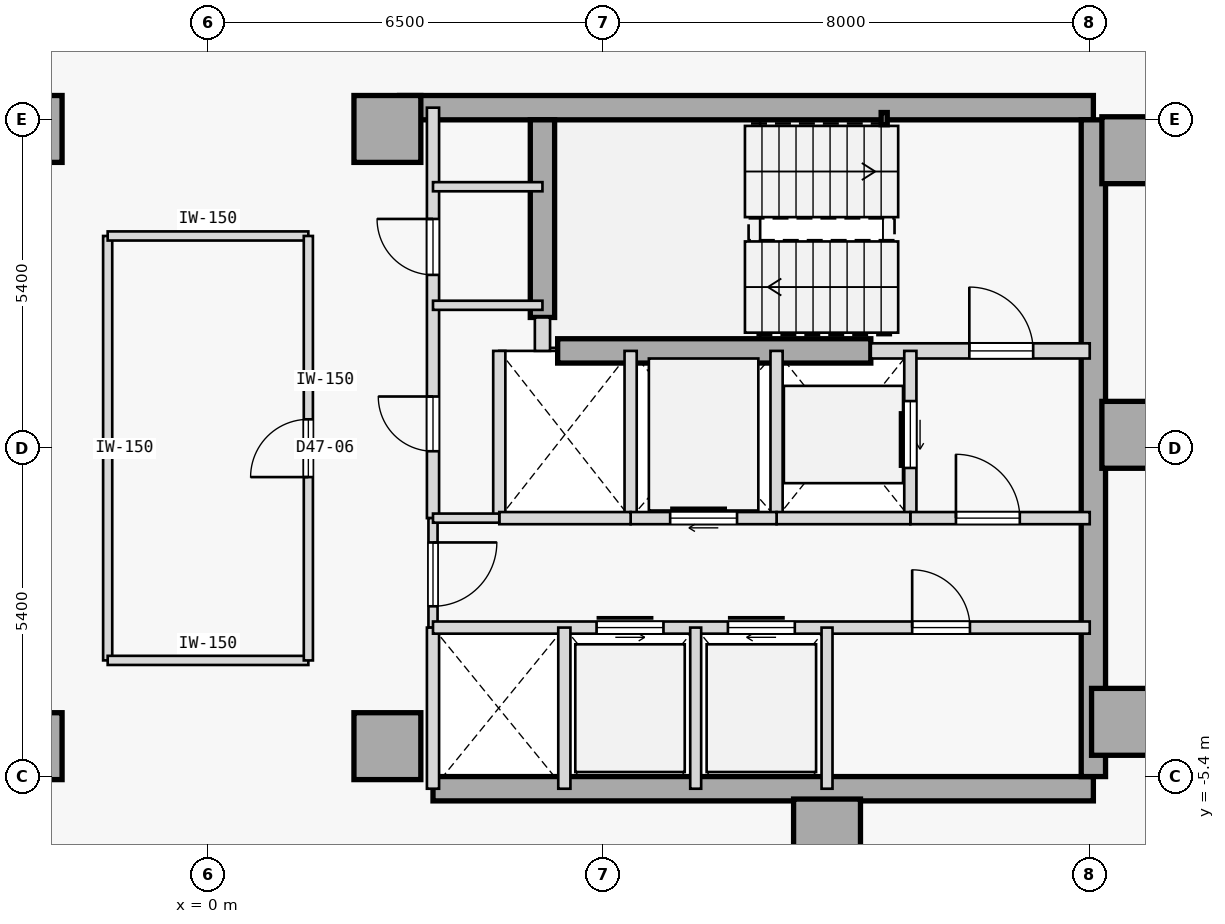
"""IFC4 building model, lengths in metres.
Left out: names, types, materials, properties, quantities, classifications, styles, units other than length and angle.
Written with IfcOpenShell. Run it as: python <this file> out.ifc"""

import sys

from ifc_helpers import new_model, si_unit, direction, frame, frame_2d, origin, origin_2d, place, context, subcontext, project, spatial, rectangle, hollow_rectangle, extrude, element, fill, save


model = new_model("IFC4")
c1 = context("Model", 3, precision=1e-05, world=origin(), true_north=direction((0.0, 1.0)))
c2 = subcontext(c1, "Body", "Model", "MODEL_VIEW")
j1 = project(units=[si_unit("LENGTHUNIT", "METRE"), si_unit("PLANEANGLEUNIT", "RADIAN")], contexts=[c1])
p1 = place(None, origin())
s1 = spatial("IfcSite", under=j1, at=p1, CompositionType="ELEMENT")
p2 = place(p1, origin())
s2 = spatial("IfcBuilding", under=s1, at=p2, CompositionType="ELEMENT")
p3 = place(p2, frame((0.0, 0.0, 182.0)))
s3 = spatial("IfcBuildingStorey", under=s2, at=p3, CompositionType="ELEMENT", Elevation=182.0)
for number, where, z_axis, x_axis in (
    (1, (-2.95, -4.9, 0.0), (0.0, 0.0, 1.0), (1.0, 0.0, 0.0)),
    (2, (-2.95, 5.25, 0.0), (0.0, 0.0, 1.0), (1.0, 0.0, 0.0)),
    (3, (15.25, 4.9, 0.0), (0.0, 0.0, 1.0), (1.0, 0.0, 0.0)),
    (4, (15.25, 0.22, 0.0), (0.0, 0.0, 1.0), (1.0, 0.0, 0.0)),
    (5, (15.08, -4.5, 0.0), (0.0, 0.0, 1.0), (1.0, 0.0, 0.0)),
    (6, (10.18, -6.32, 0.0), (0.0, 0.0, 1.0), (1.0, 0.0, 0.0)),
    (7, (2.95, -4.9, 0.0), (0.0, 0.0, 1.0), (1.0, 0.0, 0.0)),
    (8, (2.95, 5.25, 0.0), (0.0, 0.0, 1.0), (1.0, 0.0, 0.0)),
):
    element("IfcColumn", number, at=place(p3, frame(where, z_axis=z_axis, x_axis=x_axis)), inside=s3, PredefinedType="COLUMN", context=c2, shape_type="SweptSolid", body=[
        extrude(rectangle(XDim=1.1, YDim=1.1, at=origin_2d()), origin(), (0.0, 0.0, 1.0), 3.4),
    ])
p4 = place(p3, frame((3.15, 5.6, 0.0), z_axis=(0.0, 0.0, 1.0), x_axis=(1.0, 0.0, 0.0)))
e9 = element("IfcWall", 9, at=p4, inside=s3, PredefinedType="SHEAR", context=c2, shape_type="SweptSolid", body=[
    extrude(rectangle(XDim=11.41, YDim=0.4, at=frame_2d((5.705, 0.0))), origin(), (0.0, 0.0, 1.0), 3.175),
])
p5 = place(p3, frame((3.7, -5.6, 0.0), z_axis=(0.0, 0.0, 1.0), x_axis=(1.0, 0.0, 0.0)))
e10 = element("IfcWall", 10, at=p5, inside=s3, PredefinedType="SHEAR", context=c2, shape_type="SweptSolid", body=[
    extrude(rectangle(XDim=10.86, YDim=0.4, at=frame_2d((5.43, 0.0))), origin(), (0.0, 0.0, 1.0), 3.175),
])
p6 = place(p3, frame((14.56, -5.4, 0.0), z_axis=(0.0, 0.0, 1.0), x_axis=(0.0, 1.0, 0.0)))
e11 = element("IfcWall", 11, at=p6, inside=s3, PredefinedType="SHEAR", context=c2, shape_type="SweptSolid", body=[
    extrude(rectangle(XDim=10.8, YDim=0.4, at=frame_2d((5.4, 0.0))), origin(), (0.0, 0.0, 1.0), 3.175),
])
p7 = place(p3, frame((5.5, 2.15, 0.0), z_axis=(0.0, 0.0, 1.0), x_axis=(0.0, 1.0, 0.0)))
e12 = element("IfcWall", 12, at=p7, inside=s3, PredefinedType="SHEAR", context=c2, shape_type="SweptSolid", body=[
    extrude(rectangle(XDim=3.25, YDim=0.4, at=frame_2d((1.625, 0.0))), origin(), (0.0, 0.0, 1.0), 3.175),
])
p8 = place(p3, frame((5.75, 1.6, 0.0), z_axis=(0.0, 0.0, 1.0), x_axis=(1.0, 0.0, 0.0)))
e13 = element("IfcWall", 13, at=p8, inside=s3, PredefinedType="SHEAR", context=c2, shape_type="SweptSolid", body=[
    extrude(rectangle(XDim=5.15, YDim=0.4, at=frame_2d((2.575, 0.0))), origin(), (0.0, 0.0, 1.0), 3.175),
])
p9 = place(p3, frame((11.12, 5.42, 0.0), z_axis=(0.0, 0.0, 1.0), x_axis=(1.0, 0.0, 0.0)))
e14 = element("IfcColumn", 14, at=p9, inside=s3, PredefinedType="COLUMN", context=c2, shape_type="SweptSolid", body=[
    extrude(hollow_rectangle(XDim=0.1, YDim=0.2, WallThickness=0.008, at=origin_2d()), origin(), (0.0, 0.0, 1.0), 3.4),
])
p10 = place(p3, frame((10.9, 1.6, 0.0), z_axis=(0.0, 0.0, 1.0), x_axis=(1.0, 0.0, 0.0)))
e15 = element("IfcWall", 15, at=p10, inside=s3, PredefinedType="STANDARD", context=c2, shape_type="SweptSolid", body=[
    extrude(rectangle(XDim=3.6, YDim=0.25, at=frame_2d((1.8, 0.0))), origin(), (0.0, 0.0, 1.0), 3.175),
])
p11 = place(p10, frame((1.62, 0.0, 0.0)))
e16 = element("IfcOpeningElement", 16, at=p11, cuts=e15, PredefinedType="OPENING", context=c2, shape_type="SweptSolid", body=[
    extrude(rectangle(XDim=1.05, YDim=2.15, at=frame_2d((0.525, 1.075))), frame((0.0, 0.135, 0.0), z_axis=(0.0, -1.0, 0.0), x_axis=(1.0, 0.0, 0.0)), (0.0, 0.0, 1.0), 0.27),
])
p12 = place(p3, frame((5.5, 1.6, 0.0), z_axis=(0.0, 0.0, 1.0), x_axis=(0.0, 1.0, 0.0)))
e17 = element("IfcWall", 17, at=p12, inside=s3, PredefinedType="STANDARD", context=c2, shape_type="SweptSolid", body=[
    extrude(rectangle(XDim=0.55, YDim=0.25, at=frame_2d((0.275, 0.0))), origin(), (0.0, 0.0, 1.0), 3.175),
])
p13 = place(p3, frame((3.7, -1.15, 0.0), z_axis=(0.0, 0.0, 1.0), x_axis=(0.0, 1.0, 0.0)))
e18 = element("IfcWall", 18, at=p13, inside=s3, PredefinedType="STANDARD", context=c2, shape_type="SweptSolid", body=[
    extrude(rectangle(XDim=6.75, YDim=0.2, at=frame_2d((3.375, 0.0))), origin(), (0.0, 0.0, 1.0), 3.175),
])
p14 = place(p13, frame((1.1, 0.0, 0.0)))
e19 = element("IfcOpeningElement", 19, at=p14, cuts=e18, PredefinedType="OPENING", context=c2, shape_type="SweptSolid", body=[
    extrude(rectangle(XDim=0.9, YDim=2.15, at=frame_2d((0.45, 1.075))), frame((0.0, 0.11, 0.0), z_axis=(0.0, -1.0, 0.0), x_axis=(1.0, 0.0, 0.0)), (0.0, 0.0, 1.0), 0.22),
])
p15 = place(p13, frame((4.0, 0.0, 0.0)))
e20 = element("IfcOpeningElement", 20, at=p15, cuts=e18, PredefinedType="OPENING", context=c2, shape_type="SweptSolid", body=[
    extrude(rectangle(XDim=0.92, YDim=2.15, at=frame_2d((0.46, 1.075))), frame((0.0, 0.11, 0.0), z_axis=(0.0, -1.0, 0.0), x_axis=(1.0, 0.0, 0.0)), (0.0, 0.0, 1.0), 0.22),
])
p16 = place(p3, frame((3.7, -2.95, 0.0), z_axis=(0.0, 0.0, 1.0), x_axis=(0.0, 1.0, 0.0)))
e21 = element("IfcWall", 21, at=p16, inside=s3, PredefinedType="PARTITIONING", context=c2, shape_type="SweptSolid", body=[
    extrude(rectangle(XDim=1.8, YDim=0.15, at=frame_2d((0.9, 0.0))), origin(), (0.0, 0.0, 1.0), 3.175),
])
p17 = place(p16, frame((0.35, 0.0, 0.0)))
e22 = element("IfcOpeningElement", 22, at=p17, cuts=e21, PredefinedType="OPENING", context=c2, shape_type="SweptSolid", body=[
    extrude(rectangle(XDim=1.05, YDim=2.18, at=frame_2d((0.525, 1.09))), frame((0.0, 0.085, 0.0), z_axis=(0.0, -1.0, 0.0), x_axis=(1.0, 0.0, 0.0)), (0.0, 0.0, 1.0), 0.17),
])
p18 = place(p3, frame((3.7, -5.6, 0.0), z_axis=(0.0, 0.0, 1.0), x_axis=(0.0, 1.0, 0.0)))
e23 = element("IfcWall", 23, at=p18, inside=s3, PredefinedType="STANDARD", context=c2, shape_type="SweptSolid", body=[
    extrude(rectangle(XDim=2.65, YDim=0.2, at=frame_2d((1.325, 0.0))), origin(), (0.0, 0.0, 1.0), 3.175),
])
p19 = place(p3, frame((11.55, -1.15, 0.0), z_axis=(0.0, 0.0, 1.0), x_axis=(0.0, 1.0, 0.0)))
e24 = element("IfcWall", 24, at=p19, inside=s3, PredefinedType="STANDARD", context=c2, shape_type="SweptSolid", body=[
    extrude(rectangle(XDim=2.75, YDim=0.2, at=frame_2d((1.375, 0.0))), origin(), (0.0, 0.0, 1.0), 3.175),
])
p20 = place(p19, frame((0.825, 0.0, 0.0)))
e25 = element("IfcOpeningElement", 25, at=p20, cuts=e24, PredefinedType="OPENING", context=c2, shape_type="SweptSolid", body=[
    extrude(rectangle(XDim=1.1, YDim=2.15, at=frame_2d((0.55, 1.075))), frame((0.0, 0.11, 0.0), z_axis=(0.0, -1.0, 0.0), x_axis=(1.0, 0.0, 0.0)), (0.0, 0.0, 1.0), 0.22),
])
p21 = place(p3, frame((9.35, -1.15, 0.0), z_axis=(0.0, 0.0, 1.0), x_axis=(0.0, 1.0, 0.0)))
e26 = element("IfcWall", 26, at=p21, inside=s3, PredefinedType="STANDARD", context=c2, shape_type="SweptSolid", body=[
    extrude(rectangle(XDim=2.75, YDim=0.2, at=frame_2d((1.375, 0.0))), origin(), (0.0, 0.0, 1.0), 3.175),
])
p22 = place(p3, frame((11.55, -1.15, 0.0), z_axis=(0.0, 0.0, 1.0), x_axis=(1.0, 0.0, 0.0)))
e27 = element("IfcWall", 27, at=p22, inside=s3, PredefinedType="STANDARD", context=c2, shape_type="SweptSolid", body=[
    extrude(rectangle(XDim=2.95, YDim=0.2, at=frame_2d((1.475, 0.0))), origin(), (0.0, 0.0, 1.0), 3.175),
])
p23 = place(p22, frame((0.75, 0.0, 0.0)))
e28 = element("IfcOpeningElement", 28, at=p23, cuts=e27, PredefinedType="OPENING", context=c2, shape_type="SweptSolid", body=[
    extrude(rectangle(XDim=1.05, YDim=2.18, at=frame_2d((0.525, 1.09))), frame((0.0, 0.11, 0.0), z_axis=(0.0, -1.0, 0.0), x_axis=(1.0, 0.0, 0.0)), (0.0, 0.0, 1.0), 0.22),
])
p24 = place(p3, frame((9.35, -1.15, 0.0), z_axis=(0.0, 0.0, 1.0), x_axis=(1.0, 0.0, 0.0)))
e29 = element("IfcWall", 29, at=p24, inside=s3, PredefinedType="STANDARD", context=c2, shape_type="SweptSolid", body=[
    extrude(rectangle(XDim=2.2, YDim=0.2, at=frame_2d((1.1, 0.0))), origin(), (0.0, 0.0, 1.0), 3.175),
])
p25 = place(p3, frame((6.95, -1.15, 0.0), z_axis=(0.0, 0.0, 1.0), x_axis=(0.0, 1.0, 0.0)))
e30 = element("IfcWall", 30, at=p25, inside=s3, PredefinedType="STANDARD", context=c2, shape_type="SweptSolid", body=[
    extrude(rectangle(XDim=2.75, YDim=0.2, at=frame_2d((1.375, 0.0))), origin(), (0.0, 0.0, 1.0), 3.175),
])
p26 = place(p3, frame((6.95, -1.15, 0.0), z_axis=(0.0, 0.0, 1.0), x_axis=(1.0, 0.0, 0.0)))
e31 = element("IfcWall", 31, at=p26, inside=s3, PredefinedType="STANDARD", context=c2, shape_type="SweptSolid", body=[
    extrude(rectangle(XDim=2.4, YDim=0.2, at=frame_2d((1.2, 0.0))), origin(), (0.0, 0.0, 1.0), 3.175),
])
p27 = place(p26, frame((0.65, 0.0, 0.0)))
e32 = element("IfcOpeningElement", 32, at=p27, cuts=e31, PredefinedType="OPENING", context=c2, shape_type="SweptSolid", body=[
    extrude(rectangle(XDim=1.1, YDim=2.15, at=frame_2d((0.55, 1.075))), frame((0.0, 0.11, 0.0), z_axis=(0.0, -1.0, 0.0), x_axis=(1.0, 0.0, 0.0)), (0.0, 0.0, 1.0), 0.22),
])
p28 = place(p3, frame((4.79, -1.15, 0.0), z_axis=(0.0, 0.0, 1.0), x_axis=(0.0, 1.0, 0.0)))
e33 = element("IfcWall", 33, at=p28, inside=s3, PredefinedType="STANDARD", context=c2, shape_type="SweptSolid", body=[
    extrude(rectangle(XDim=2.75, YDim=0.2, at=frame_2d((1.375, 0.0))), origin(), (0.0, 0.0, 1.0), 3.175),
])
p29 = place(p3, frame((4.79, -1.15, 0.0), z_axis=(0.0, 0.0, 1.0), x_axis=(1.0, 0.0, 0.0)))
e34 = element("IfcWall", 34, at=p29, inside=s3, PredefinedType="STANDARD", context=c2, shape_type="SweptSolid", body=[
    extrude(rectangle(XDim=2.16, YDim=0.2, at=frame_2d((1.08, 0.0))), origin(), (0.0, 0.0, 1.0), 3.175),
])
p30 = place(p3, frame((3.7, -1.15, 0.0), z_axis=(0.0, 0.0, 1.0), x_axis=(1.0, 0.0, 0.0)))
e35 = element("IfcWall", 35, at=p30, inside=s3, PredefinedType="PARTITIONING", context=c2, shape_type="SweptSolid", body=[
    extrude(rectangle(XDim=1.09, YDim=0.15, at=frame_2d((0.545, 0.0))), origin(), (0.0, 0.0, 1.0), 3.175),
])
p31 = place(p3, frame((3.7, -2.95, 0.0), z_axis=(0.0, 0.0, 1.0), x_axis=(1.0, 0.0, 0.0)))
e36 = element("IfcWall", 36, at=p31, inside=s3, PredefinedType="STANDARD", context=c2, shape_type="SweptSolid", body=[
    extrude(rectangle(XDim=10.8, YDim=0.2, at=frame_2d((5.4, 0.0))), origin(), (0.0, 0.0, 1.0), 3.175),
])
p32 = place(p31, frame((2.69, 0.0, 0.0)))
e37 = element("IfcOpeningElement", 37, at=p32, cuts=e36, PredefinedType="OPENING", context=c2, shape_type="SweptSolid", body=[
    extrude(rectangle(XDim=1.1, YDim=2.15, at=frame_2d((0.55, 1.075))), frame((0.0, 0.11, 0.0), z_axis=(0.0, -1.0, 0.0), x_axis=(1.0, 0.0, 0.0)), (0.0, 0.0, 1.0), 0.22),
])
p33 = place(p31, frame((4.85, 0.0, 0.0)))
e38 = element("IfcOpeningElement", 38, at=p33, cuts=e36, PredefinedType="OPENING", context=c2, shape_type="SweptSolid", body=[
    extrude(rectangle(XDim=1.1, YDim=2.15, at=frame_2d((0.55, 1.075))), frame((0.0, 0.11, 0.0), z_axis=(0.0, -1.0, 0.0), x_axis=(1.0, 0.0, 0.0)), (0.0, 0.0, 1.0), 0.22),
])
p34 = place(p31, frame((7.88, 0.0, 0.0)))
e39 = element("IfcOpeningElement", 39, at=p34, cuts=e36, PredefinedType="OPENING", context=c2, shape_type="SweptSolid", body=[
    extrude(rectangle(XDim=0.95, YDim=2.15, at=frame_2d((0.475, 1.075))), frame((0.0, 0.11, 0.0), z_axis=(0.0, -1.0, 0.0), x_axis=(1.0, 0.0, 0.0)), (0.0, 0.0, 1.0), 0.22),
])
p35 = place(p3, frame((5.86, -5.6, 0.0), z_axis=(0.0, 0.0, 1.0), x_axis=(0.0, 1.0, 0.0)))
e40 = element("IfcWall", 40, at=p35, inside=s3, PredefinedType="STANDARD", context=c2, shape_type="SweptSolid", body=[
    extrude(rectangle(XDim=2.65, YDim=0.2, at=frame_2d((1.325, 0.0))), origin(), (0.0, 0.0, 1.0), 3.175),
])
for number, where, z_axis, x_axis in (
    (41, (10.18, -5.6, 0.0), (0.0, 0.0, 1.0), (0.0, 1.0, 0.0)),
    (42, (8.02, -5.6, 0.0), (0.0, 0.0, 1.0), (0.0, 1.0, 0.0)),
):
    element("IfcWall", number, at=place(p3, frame(where, z_axis=z_axis, x_axis=x_axis)), inside=s3, PredefinedType="STANDARD", context=c2, shape_type="SweptSolid", body=[
        extrude(rectangle(XDim=2.65, YDim=0.18, at=frame_2d((1.325, 0.0))), origin(), (0.0, 0.0, 1.0), 3.175),
    ])
for number, where, z_axis, x_axis in (
    (43, (3.7, 4.3, 0.0), (0.0, 0.0, 1.0), (1.0, 0.0, 0.0)),
    (44, (3.7, 2.35, 0.0), (0.0, 0.0, 1.0), (1.0, 0.0, 0.0)),
):
    element("IfcWall", number, at=place(p3, frame(where, z_axis=z_axis, x_axis=x_axis)), inside=s3, PredefinedType="PARTITIONING", context=c2, shape_type="SweptSolid", body=[
        extrude(rectangle(XDim=1.8, YDim=0.15, at=frame_2d((0.9, 0.0))), origin(), (0.0, 0.0, 1.0), 3.175),
    ])
p36 = place(p3, frame((-1.65, -3.49, 0.0), z_axis=(0.0, 0.0, 1.0), x_axis=(-3.4979712e-05, 0.999999999388, 0.0)))
e45 = element("IfcWall", 45, at=p36, inside=s3, PredefinedType="PARTITIONING", context=c2, shape_type="SweptSolid", body=[
    extrude(rectangle(XDim=6.979, YDim=0.15, at=frame_2d((3.49, 0.0))), origin(), (0.0, 0.0, 1.0), 3.175),
])
p37 = place(p3, frame((-1.65, -3.49, 0.0), z_axis=(0.0, 0.0, 1.0), x_axis=(0.999999975374, -0.000221926315, 0.0)))
e46 = element("IfcWall", 46, at=p37, inside=s3, PredefinedType="PARTITIONING", context=c2, shape_type="SweptSolid", body=[
    extrude(rectangle(XDim=3.3, YDim=0.15, at=frame_2d((1.65, 0.0))), origin(), (0.0, 0.0, 1.0), 3.175),
])
p38 = place(p3, frame((-1.65, 3.49, 0.0), z_axis=(0.0, 0.0, 1.0), x_axis=(1.0, 0.0, 0.0)))
e47 = element("IfcWall", 47, at=p38, inside=s3, PredefinedType="PARTITIONING", context=c2, shape_type="SweptSolid", body=[
    extrude(rectangle(XDim=3.3, YDim=0.15, at=frame_2d((1.65, 0.0))), origin(), (0.0, 0.0, 1.0), 3.175),
])
p39 = place(p3, frame((1.65, -3.49, 0.0), z_axis=(0.0, 0.0, 1.0), x_axis=(-6.9952083e-05, 0.999999997553, 0.0)))
e48 = element("IfcWall", 48, at=p39, inside=s3, PredefinedType="PARTITIONING", context=c2, shape_type="SweptSolid", body=[
    extrude(rectangle(XDim=6.98, YDim=0.15, at=frame_2d((3.49, 0.0))), origin(), (0.0, 0.0, 1.0), 3.175),
])
p40 = place(p39, frame((3.015, 0.0, 0.0)))
e49 = element("IfcOpeningElement", 49, at=p40, cuts=e48, PredefinedType="OPENING", context=c2, shape_type="SweptSolid", body=[
    extrude(rectangle(XDim=0.95, YDim=2.15, at=frame_2d((0.475, 1.075))), frame((0.0, 0.085, 0.0), z_axis=(0.0, -1.0, 0.0), x_axis=(1.0, 0.0, 0.0)), (0.0, 0.0, 1.0), 0.17),
])
p41 = place(p11, origin())
e50 = element("IfcDoor", 50, at=p41, inside=s3, OperationType="SINGLE_SWING_LEFT", PredefinedType="DOOR", context=c2, shape_type="SweptSolid", body=[
    extrude(rectangle(XDim=1.05, YDim=2.15, at=frame_2d((0.525, 1.075))), frame((0.0, 0.025, 0.0), z_axis=(0.0, -1.0, 0.0), x_axis=(1.0, 0.0, 0.0)), (0.0, 0.0, 1.0), 0.05),
])
fill(e16, e50)
p42 = place(p23, origin())
e51 = element("IfcDoor", 51, at=p42, inside=s3, OperationType="SINGLE_SWING_LEFT", PredefinedType="DOOR", context=c2, shape_type="SweptSolid", body=[
    extrude(rectangle(XDim=1.05, YDim=2.18, at=frame_2d((0.525, 1.09))), frame((0.0, 0.025, 0.0), z_axis=(0.0, -1.0, 0.0), x_axis=(1.0, 0.0, 0.0)), (0.0, 0.0, 1.0), 0.05),
])
fill(e28, e51)
p43 = place(p17, frame((1.05, 0.0, 0.0), z_axis=(0.0, 0.0, 1.0), x_axis=(-1.0, 0.0, 0.0)))
e52 = element("IfcDoor", 52, at=p43, inside=s3, OperationType="SINGLE_SWING_RIGHT", PredefinedType="DOOR", context=c2, shape_type="SweptSolid", body=[
    extrude(rectangle(XDim=1.05, YDim=2.18, at=frame_2d((0.525, 1.09))), frame((0.0, 0.025, 0.0), z_axis=(0.0, -1.0, 0.0), x_axis=(1.0, 0.0, 0.0)), (0.0, 0.0, 1.0), 0.05),
])
fill(e22, e52)
p44 = place(p20, origin())
e53 = element("IfcDoor", 53, at=p44, inside=s3, OperationType="SLIDING_TO_RIGHT", PredefinedType="DOOR", context=c2, shape_type="SweptSolid", body=[
    extrude(rectangle(XDim=1.1, YDim=2.15, at=frame_2d((0.55, 1.075))), frame((0.0, 0.025, 0.0), z_axis=(0.0, -1.0, 0.0), x_axis=(1.0, 0.0, 0.0)), (0.0, 0.0, 1.0), 0.05),
])
fill(e25, e53)
p45 = place(p27, origin())
e54 = element("IfcDoor", 54, at=p45, inside=s3, OperationType="SLIDING_TO_RIGHT", PredefinedType="DOOR", context=c2, shape_type="SweptSolid", body=[
    extrude(rectangle(XDim=1.1, YDim=2.15, at=frame_2d((0.55, 1.075))), frame((0.0, 0.025, 0.0), z_axis=(0.0, -1.0, 0.0), x_axis=(1.0, 0.0, 0.0)), (0.0, 0.0, 1.0), 0.05),
])
fill(e32, e54)
p46 = place(p32, origin())
e55 = element("IfcDoor", 55, at=p46, inside=s3, OperationType="SLIDING_TO_LEFT", PredefinedType="DOOR", context=c2, shape_type="SweptSolid", body=[
    extrude(rectangle(XDim=1.1, YDim=2.15, at=frame_2d((0.55, 1.075))), frame((0.0, 0.025, 0.0), z_axis=(0.0, -1.0, 0.0), x_axis=(1.0, 0.0, 0.0)), (0.0, 0.0, 1.0), 0.05),
])
fill(e37, e55)
p47 = place(p33, origin())
e56 = element("IfcDoor", 56, at=p47, inside=s3, OperationType="SLIDING_TO_RIGHT", PredefinedType="DOOR", context=c2, shape_type="SweptSolid", body=[
    extrude(rectangle(XDim=1.1, YDim=2.15, at=frame_2d((0.55, 1.075))), frame((0.0, 0.025, 0.0), z_axis=(0.0, -1.0, 0.0), x_axis=(1.0, 0.0, 0.0)), (0.0, 0.0, 1.0), 0.05),
])
fill(e38, e56)
p48 = place(p34, origin())
e57 = element("IfcDoor", 57, at=p48, inside=s3, OperationType="SINGLE_SWING_LEFT", PredefinedType="DOOR", context=c2, shape_type="SweptSolid", body=[
    extrude(rectangle(XDim=0.95, YDim=2.15, at=frame_2d((0.475, 1.075))), frame((0.0, 0.025, 0.0), z_axis=(0.0, -1.0, 0.0), x_axis=(1.0, 0.0, 0.0)), (0.0, 0.0, 1.0), 0.05),
])
fill(e39, e57)
p49 = place(p14, origin())
e58 = element("IfcDoor", 58, at=p49, inside=s3, OperationType="SINGLE_SWING_RIGHT", PredefinedType="DOOR", context=c2, shape_type="SweptSolid", body=[
    extrude(rectangle(XDim=0.9, YDim=2.15, at=frame_2d((0.45, 1.075))), frame((0.0, 0.025, 0.0), z_axis=(0.0, -1.0, 0.0), x_axis=(1.0, 0.0, 0.0)), (0.0, 0.0, 1.0), 0.05),
])
fill(e19, e58)
p50 = place(p15, origin())
e59 = element("IfcDoor", 59, at=p50, inside=s3, OperationType="SINGLE_SWING_RIGHT", PredefinedType="DOOR", context=c2, shape_type="SweptSolid", body=[
    extrude(rectangle(XDim=0.92, YDim=2.15, at=frame_2d((0.46, 1.075))), frame((0.0, 0.025, 0.0), z_axis=(0.0, -1.0, 0.0), x_axis=(1.0, 0.0, 0.0)), (0.0, 0.0, 1.0), 0.05),
])
fill(e20, e59)
p51 = place(p40, origin())
e60 = element("IfcDoor", 60, at=p51, inside=s3, OperationType="SINGLE_SWING_LEFT", PredefinedType="DOOR", context=c2, shape_type="SweptSolid", body=[
    extrude(rectangle(XDim=0.95, YDim=2.15, at=frame_2d((0.475, 1.075))), frame((0.0, 0.025, 0.0), z_axis=(0.0, -1.0, 0.0), x_axis=(1.0, 0.0, 0.0)), (0.0, 0.0, 1.0), 0.05),
])
fill(e49, e60)
save(model, sys.argv[1])
